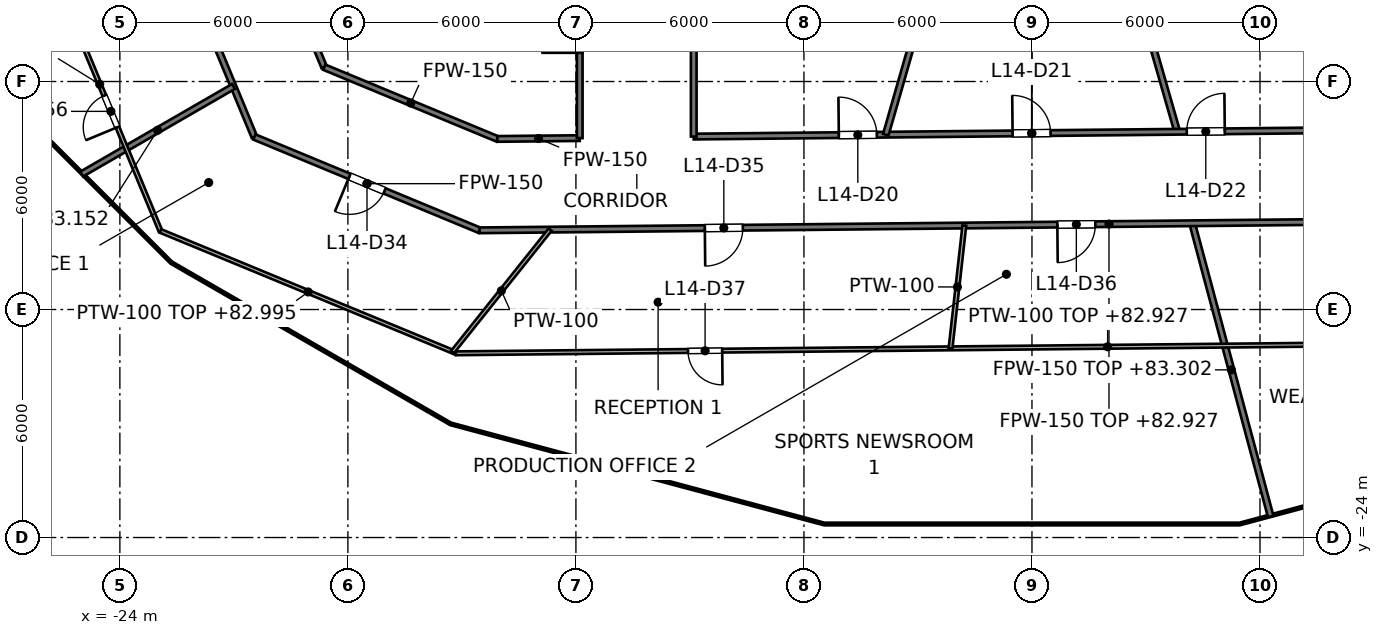
"""IFC4 building model, lengths in metres.
Left out: names, types, materials, properties, quantities, classifications, styles, units other than length and angle.
Written with IfcOpenShell. Run it as: python <this file> out.ifc"""

import sys

from ifc_helpers import new_model, si_unit, direction, frame, frame_2d, origin, place, context, subcontext, project, spatial, rectangle, extrude, element, fill, save


model = new_model("IFC4")
c1 = context("Model", 3, precision=1e-05, world=origin(), true_north=direction((0.0, 1.0)))
c2 = subcontext(c1, "Body", "Model", "MODEL_VIEW")
j1 = project(units=[si_unit("LENGTHUNIT", "METRE"), si_unit("PLANEANGLEUNIT", "RADIAN")], contexts=[c1])
p1 = place(None, origin())
s1 = spatial("IfcSite", under=j1, at=p1, CompositionType="ELEMENT")
p2 = place(p1, origin())
s2 = spatial("IfcBuilding", under=s1, at=p2, CompositionType="ELEMENT")
p3 = place(p2, frame((0.0, 0.0, 79.8)))
s3 = spatial("IfcBuildingStorey", under=s2, at=p3, CompositionType="ELEMENT", Elevation=79.8)
p4 = place(p3, frame((4.215, -15.73, 0.0), z_axis=(0.0, 0.0, 1.0), x_axis=(0.258746779093, -0.965945187011, 0.0)))
e1 = element("IfcWall", 1, at=p4, inside=s3, PredefinedType="PARTITIONING", context=c2, shape_type="SweptSolid", body=[
    extrude(rectangle(XDim=7.988, YDim=0.15, at=frame_2d((3.994, 0.0))), origin(), (0.0, 0.0, 1.0), 3.502),
])
p5 = place(p3, frame((2.296, -8.0, 0.0), z_axis=(0.0, 0.0, 1.0), x_axis=(0.275935525478, -0.961176147113, 0.0)))
e2 = element("IfcWall", 2, at=p5, inside=s3, PredefinedType="PARTITIONING", context=c2, shape_type="SweptSolid", body=[
    extrude(rectangle(XDim=5.548, YDim=0.15, at=frame_2d((2.774, 0.0))), origin(), (0.0, 0.0, 1.0), 4.05),
])
p6 = place(p3, frame((-22.9, -7.572, 0.0), z_axis=(0.0, 0.0, 1.0), x_axis=(0.382860357704, -0.923806227788, 0.0)))
e3 = element("IfcWall", 3, at=p6, inside=s3, PredefinedType="PARTITIONING", context=c2, shape_type="SweptSolid", body=[
    extrude(rectangle(XDim=6.374, YDim=0.15, at=frame_2d((3.187, 0.0))), origin(), (0.0, 0.0, 1.0), 3.195),
])
p7 = place(p6, frame((1.916, 0.0, 0.0)))
e4 = element("IfcOpeningElement", 4, at=p7, cuts=e3, PredefinedType="OPENING", context=c2, shape_type="SweptSolid", body=[
    extrude(rectangle(XDim=1.0, YDim=2.1, at=frame_2d((0.5, 1.05))), frame((0.0, 0.075, 0.0), z_axis=(0.0, -1.0, 0.0), x_axis=(1.0, 0.0, 0.0)), (0.0, 0.0, 1.0), 0.15),
])
p8 = place(p3, frame((-20.5, -7.095, 0.0), z_axis=(0.0, 0.0, 1.0), x_axis=(0.382860567438, -0.923806140866, 0.0)))
e5 = element("IfcWall", 5, at=p8, inside=s3, PredefinedType="PARTITIONING", context=c2, shape_type="SweptSolid", body=[
    extrude(rectangle(XDim=4.902, YDim=0.15, at=frame_2d((2.451, 0.0))), origin(), (0.0, 0.0, 1.0), 3.195),
])
p9 = place(p3, frame((-20.46, -13.46, 0.0), z_axis=(0.0, 0.0, 1.0), x_axis=(0.923801547606, -0.382871650349, 0.0)))
e6 = element("IfcWall", 6, at=p9, inside=s3, PredefinedType="PARTITIONING", context=c2, shape_type="SweptSolid", body=[
    extrude(rectangle(XDim=6.415, YDim=0.15, at=frame_2d((3.208, 0.0))), origin(), (0.0, 0.0, 1.0), 3.195),
])
p10 = place(p9, frame((2.707, 0.0, 0.0)))
e7 = element("IfcOpeningElement", 7, at=p10, cuts=e6, PredefinedType="OPENING", context=c2, shape_type="SweptSolid", body=[
    extrude(rectangle(XDim=1.0, YDim=2.1, at=frame_2d((0.5, 1.05))), frame((0.0, 0.075, 0.0), z_axis=(0.0, -1.0, 0.0), x_axis=(1.0, 0.0, 0.0)), (0.0, 0.0, 1.0), 0.15),
])
p11 = place(p3, frame((-18.623, -11.623, 0.0), z_axis=(0.0, 0.0, 1.0), x_axis=(0.923791670587, -0.38289548098, 0.0)))
e8 = element("IfcWall", 8, at=p11, inside=s3, PredefinedType="PARTITIONING", context=c2, shape_type="SweptSolid", body=[
    extrude(rectangle(XDim=4.931, YDim=0.15, at=frame_2d((2.465, 0.0))), origin(), (0.0, 0.0, 1.0), 3.195),
])
p12 = place(p3, frame((-14.534, -15.916, 0.0), z_axis=(0.0, 0.0, 1.0), x_axis=(0.99995100325, 0.009899045409, 0.0)))
e9 = element("IfcWall", 9, at=p12, inside=s3, PredefinedType="PARTITIONING", context=c2, shape_type="SweptSolid", body=[
    extrude(rectangle(XDim=33.123, YDim=0.15, at=frame_2d((16.561, 0.0))), origin(), (0.0, 0.0, 1.0), 3.127),
])
p13 = place(p12, frame((5.927, 0.0, 0.0)))
e10 = element("IfcOpeningElement", 10, at=p13, cuts=e9, PredefinedType="OPENING", context=c2, shape_type="SweptSolid", body=[
    extrude(rectangle(XDim=1.0, YDim=2.1, at=frame_2d((0.5, 1.05))), frame((0.0, 0.075, 0.0), z_axis=(0.0, -1.0, 0.0), x_axis=(1.0, 0.0, 0.0)), (0.0, 0.0, 1.0), 0.15),
])
p14 = place(p12, frame((15.202, 0.0, 0.0)))
e11 = element("IfcOpeningElement", 11, at=p14, cuts=e9, PredefinedType="OPENING", context=c2, shape_type="SweptSolid", body=[
    extrude(rectangle(XDim=1.0, YDim=2.1, at=frame_2d((0.5, 1.05))), frame((0.0, 0.075, 0.0), z_axis=(0.0, -1.0, 0.0), x_axis=(1.0, 0.0, 0.0)), (0.0, 0.0, 1.0), 0.15),
])
p15 = place(p12, frame((24.01, 0.0, 0.0)))
e12 = element("IfcOpeningElement", 12, at=p15, cuts=e9, PredefinedType="OPENING", context=c2, shape_type="SweptSolid", body=[
    extrude(rectangle(XDim=1.2, YDim=2.1, at=frame_2d((0.6, 1.05))), frame((0.0, 0.075, 0.0), z_axis=(0.0, -1.0, 0.0), x_axis=(1.0, 0.0, 0.0)), (0.0, 0.0, 1.0), 0.15),
])
p16 = place(p3, frame((-14.068, -13.511, 0.0), z_axis=(0.0, 0.0, 1.0), x_axis=(0.999950911515, 0.009908307647, 0.0)))
e13 = element("IfcWall", 13, at=p16, inside=s3, PredefinedType="PARTITIONING", context=c2, shape_type="SweptSolid", body=[
    extrude(rectangle(XDim=2.168, YDim=0.15, at=frame_2d((1.084, 0.0))), origin(), (0.0, 0.0, 1.0), 3.195),
])
p17 = place(p3, frame((-8.9, -13.449, 0.0), z_axis=(0.0, 0.0, 1.0), x_axis=(0.999950969978, 0.009902405776, 0.0)))
e14 = element("IfcWall", 14, at=p17, inside=s3, PredefinedType="PARTITIONING", context=c2, shape_type="SweptSolid", body=[
    extrude(rectangle(XDim=17.801, YDim=0.15, at=frame_2d((8.9, 0.0))), origin(), (0.0, 0.0, 1.0), 3.127),
])
p18 = place(p17, frame((3.818, 0.0, 0.0)))
e15 = element("IfcOpeningElement", 15, at=p18, cuts=e14, PredefinedType="OPENING", context=c2, shape_type="SweptSolid", body=[
    extrude(rectangle(XDim=1.0, YDim=2.1, at=frame_2d((0.5, 1.05))), frame((0.0, 0.075, 0.0), z_axis=(0.0, -1.0, 0.0), x_axis=(1.0, 0.0, 0.0)), (0.0, 0.0, 1.0), 0.15),
])
p19 = place(p17, frame((8.391, 0.0, 0.0)))
e16 = element("IfcOpeningElement", 16, at=p19, cuts=e14, PredefinedType="OPENING", context=c2, shape_type="SweptSolid", body=[
    extrude(rectangle(XDim=1.0, YDim=2.1, at=frame_2d((0.5, 1.05))), frame((0.0, 0.075, 0.0), z_axis=(0.0, -1.0, 0.0), x_axis=(1.0, 0.0, 0.0)), (0.0, 0.0, 1.0), 0.15),
])
p20 = place(p17, frame((12.974, 0.0, 0.0)))
e17 = element("IfcOpeningElement", 17, at=p20, cuts=e14, PredefinedType="OPENING", context=c2, shape_type="SweptSolid", body=[
    extrude(rectangle(XDim=1.0, YDim=2.1, at=frame_2d((0.5, 1.05))), frame((0.0, 0.075, 0.0), z_axis=(0.0, -1.0, 0.0), x_axis=(1.0, 0.0, 0.0)), (0.0, 0.0, 1.0), 0.15),
])
p21 = place(p3, frame((-25.005, -14.436, 0.0), z_axis=(0.0, 0.0, 1.0), x_axis=(0.866022493768, 0.500005040262, 0.0)))
e18 = element("IfcWall", 18, at=p21, inside=s3, PredefinedType="PARTITIONING", context=c2, shape_type="SweptSolid", body=[
    extrude(rectangle(XDim=4.612, YDim=0.15, at=frame_2d((2.306, 0.0))), origin(), (0.0, 0.0, 1.0), 3.352),
])
p22 = place(p3, frame((-3.846, -13.399, 0.0), z_axis=(0.0, 0.0, 1.0), x_axis=(0.275914969745, 0.961182048038, 0.0)))
e19 = element("IfcWall", 19, at=p22, inside=s3, PredefinedType="PARTITIONING", context=c2, shape_type="SweptSolid", body=[
    extrude(rectangle(XDim=5.617, YDim=0.15, at=frame_2d((2.809, 0.0))), origin(), (0.0, 0.0, 1.0), 4.05),
])
p23 = place(p3, frame((-8.9, -13.449, 0.0), z_axis=(0.0, 0.0, 1.0), x_axis=(0.0, 1.0, 0.0)))
e20 = element("IfcWall", 20, at=p23, inside=s3, PredefinedType="PARTITIONING", context=c2, shape_type="SweptSolid", body=[
    extrude(rectangle(XDim=5.449, YDim=0.15, at=frame_2d((2.725, 0.0))), origin(), (0.0, 0.0, 1.0), 3.127),
])
p24 = place(p3, frame((-11.9, -13.49, 0.0), z_axis=(0.0, 0.0, 1.0), x_axis=(0.0, 1.0, 0.0)))
e21 = element("IfcWall", 21, at=p24, inside=s3, PredefinedType="PARTITIONING", context=c2, shape_type="SweptSolid", body=[
    extrude(rectangle(XDim=5.49, YDim=0.15, at=frame_2d((2.745, 0.0))), origin(), (0.0, 0.0, 1.0), 3.195),
])
p25 = place(p24, frame((2.245, 0.0, 0.0)))
e22 = element("IfcOpeningElement", 22, at=p25, cuts=e21, PredefinedType="OPENING", context=c2, shape_type="SweptSolid", body=[
    extrude(rectangle(XDim=1.0, YDim=2.1, at=frame_2d((0.5, 1.05))), frame((0.0, 0.075, 0.0), z_axis=(0.0, -1.0, 0.0), x_axis=(1.0, 0.0, 0.0)), (0.0, 0.0, 1.0), 0.15),
])
p26 = place(p3, frame((-26.13, -8.215, 0.0), z_axis=(0.0, 0.0, 1.0), x_axis=(0.382761353451, -0.923847252691, 0.0)))
e23 = element("IfcWall", 23, at=p26, inside=s3, PredefinedType="PARTITIONING", context=c2, shape_type="SweptSolid", body=[
    extrude(rectangle(XDim=8.353, YDim=0.1, at=frame_2d((4.177, 0.0))), origin(), (0.0, 0.0, 1.0), 3.195),
])
p27 = place(p26, frame((4.498, 0.0, 0.0)))
e24 = element("IfcOpeningElement", 24, at=p27, cuts=e23, PredefinedType="OPENING", context=c2, shape_type="SweptSolid", body=[
    extrude(rectangle(XDim=0.9, YDim=2.1, at=frame_2d((0.45, 1.05))), frame((0.0, 0.05, 0.0), z_axis=(0.0, -1.0, 0.0), x_axis=(1.0, 0.0, 0.0)), (0.0, 0.0, 1.0), 0.1),
])
p28 = place(p3, frame((-22.932, -15.932, 0.0), z_axis=(0.0, 0.0, 1.0), x_axis=(0.924240497819, -0.381810819897, 0.0)))
e25 = element("IfcWall", 25, at=p28, inside=s3, PredefinedType="PARTITIONING", context=c2, shape_type="SweptSolid", body=[
    extrude(rectangle(XDim=8.412, YDim=0.1, at=frame_2d((4.206, 0.0))), origin(), (0.0, 0.0, 1.0), 3.195),
])
p29 = place(p3, frame((-15.161, -19.152, 0.0), z_axis=(0.0, 0.0, 1.0), x_axis=(0.999950294367, 0.009970395935, 0.0)))
e26 = element("IfcWall", 26, at=p29, inside=s3, PredefinedType="PARTITIONING", context=c2, shape_type="SweptSolid", body=[
    extrude(rectangle(XDim=34.306, YDim=0.1, at=frame_2d((17.153, 0.0))), origin(), (0.0, 0.0, 1.0), 3.127),
])
p30 = place(p29, frame((6.111, 0.0, 0.0)))
e27 = element("IfcOpeningElement", 27, at=p30, cuts=e26, PredefinedType="OPENING", context=c2, shape_type="SweptSolid", body=[
    extrude(rectangle(XDim=0.9, YDim=2.1, at=frame_2d((0.45, 1.05))), frame((0.0, 0.05, 0.0), z_axis=(0.0, -1.0, 0.0), x_axis=(1.0, 0.0, 0.0)), (0.0, 0.0, 1.0), 0.1),
])
p31 = place(p29, frame((26.573, 0.0, 0.0)))
e28 = element("IfcOpeningElement", 28, at=p31, cuts=e26, PredefinedType="OPENING", context=c2, shape_type="SweptSolid", body=[
    extrude(rectangle(XDim=0.9, YDim=2.1, at=frame_2d((0.45, 1.05))), frame((0.0, 0.05, 0.0), z_axis=(0.0, -1.0, 0.0), x_axis=(1.0, 0.0, 0.0)), (0.0, 0.0, 1.0), 0.1),
])
p32 = place(p3, frame((-15.246, -19.117, 0.0), z_axis=(0.0, 0.0, 1.0), x_axis=(0.623646106515, 0.781706808099, 0.0)))
e29 = element("IfcWall", 29, at=p32, inside=s3, PredefinedType="PARTITIONING", context=c2, shape_type="SweptSolid", body=[
    extrude(rectangle(XDim=4.118, YDim=0.1, at=frame_2d((2.059, 0.0))), origin(), (0.0, 0.0, 1.0), 4.05),
])
p33 = place(p3, frame((-2.143, -19.023, 0.0), z_axis=(0.0, 0.0, 1.0), x_axis=(0.111855891417, 0.993724438441, 0.0)))
e30 = element("IfcWall", 30, at=p33, inside=s3, PredefinedType="PARTITIONING", context=c2, shape_type="SweptSolid", body=[
    extrude(rectangle(XDim=3.254, YDim=0.1, at=frame_2d((1.627, 0.0))), origin(), (0.0, 0.0, 1.0), 4.05),
])
p34 = place(p18, origin())
e31 = element("IfcDoor", 31, at=p34, inside=s3, OperationType="SINGLE_SWING_LEFT", PredefinedType="DOOR", context=c2, shape_type="SweptSolid", body=[
    extrude(rectangle(XDim=1.0, YDim=2.1, at=frame_2d((0.5, 1.05))), frame((0.0, 0.025, 0.0), z_axis=(0.0, -1.0, 0.0), x_axis=(1.0, 0.0, 0.0)), (0.0, 0.0, 1.0), 0.05),
])
fill(e15, e31)
p35 = place(p19, origin())
e32 = element("IfcDoor", 32, at=p35, inside=s3, OperationType="SINGLE_SWING_LEFT", PredefinedType="DOOR", context=c2, shape_type="SweptSolid", body=[
    extrude(rectangle(XDim=1.0, YDim=2.1, at=frame_2d((0.5, 1.05))), frame((0.0, 0.025, 0.0), z_axis=(0.0, -1.0, 0.0), x_axis=(1.0, 0.0, 0.0)), (0.0, 0.0, 1.0), 0.05),
])
fill(e16, e32)
p36 = place(p20, origin())
e33 = element("IfcDoor", 33, at=p36, inside=s3, OperationType="SINGLE_SWING_RIGHT", PredefinedType="DOOR", context=c2, shape_type="SweptSolid", body=[
    extrude(rectangle(XDim=1.0, YDim=2.1, at=frame_2d((0.5, 1.05))), frame((0.0, 0.025, 0.0), z_axis=(0.0, -1.0, 0.0), x_axis=(1.0, 0.0, 0.0)), (0.0, 0.0, 1.0), 0.05),
])
fill(e17, e33)
p37 = place(p25, origin())
e34 = element("IfcDoor", 34, at=p37, inside=s3, OperationType="SINGLE_SWING_LEFT", PredefinedType="DOOR", context=c2, shape_type="SweptSolid", body=[
    extrude(rectangle(XDim=1.0, YDim=2.1, at=frame_2d((0.5, 1.05))), frame((0.0, 0.025, 0.0), z_axis=(0.0, -1.0, 0.0), x_axis=(1.0, 0.0, 0.0)), (0.0, 0.0, 1.0), 0.05),
])
fill(e22, e34)
p38 = place(p10, origin())
e35 = element("IfcDoor", 35, at=p38, inside=s3, OperationType="SINGLE_SWING_LEFT", PredefinedType="DOOR", context=c2, shape_type="SweptSolid", body=[
    extrude(rectangle(XDim=1.0, YDim=2.1, at=frame_2d((0.5, 1.05))), frame((0.0, 0.025, 0.0), z_axis=(0.0, -1.0, 0.0), x_axis=(1.0, 0.0, 0.0)), (0.0, 0.0, 1.0), 0.05),
])
fill(e7, e35)
p39 = place(p13, origin())
e36 = element("IfcDoor", 36, at=p39, inside=s3, OperationType="SINGLE_SWING_LEFT", PredefinedType="DOOR", context=c2, shape_type="SweptSolid", body=[
    extrude(rectangle(XDim=1.0, YDim=2.1, at=frame_2d((0.5, 1.05))), frame((0.0, 0.025, 0.0), z_axis=(0.0, -1.0, 0.0), x_axis=(1.0, 0.0, 0.0)), (0.0, 0.0, 1.0), 0.05),
])
fill(e10, e36)
p40 = place(p14, origin())
e37 = element("IfcDoor", 37, at=p40, inside=s3, OperationType="SINGLE_SWING_LEFT", PredefinedType="DOOR", context=c2, shape_type="SweptSolid", body=[
    extrude(rectangle(XDim=1.0, YDim=2.1, at=frame_2d((0.5, 1.05))), frame((0.0, 0.025, 0.0), z_axis=(0.0, -1.0, 0.0), x_axis=(1.0, 0.0, 0.0)), (0.0, 0.0, 1.0), 0.05),
])
fill(e11, e37)
p41 = place(p30, origin())
e38 = element("IfcDoor", 38, at=p41, inside=s3, OperationType="SINGLE_SWING_RIGHT", PredefinedType="DOOR", context=c2, shape_type="SweptSolid", body=[
    extrude(rectangle(XDim=0.9, YDim=2.1, at=frame_2d((0.45, 1.05))), frame((0.0, 0.025, 0.0), z_axis=(0.0, -1.0, 0.0), x_axis=(1.0, 0.0, 0.0)), (0.0, 0.0, 1.0), 0.05),
])
fill(e27, e38)
p42 = place(p27, origin())
e39 = element("IfcDoor", 39, at=p42, inside=s3, OperationType="SINGLE_SWING_RIGHT", PredefinedType="DOOR", context=c2, shape_type="SweptSolid", body=[
    extrude(rectangle(XDim=0.9, YDim=2.1, at=frame_2d((0.45, 1.05))), frame((0.0, 0.025, 0.0), z_axis=(0.0, -1.0, 0.0), x_axis=(1.0, 0.0, 0.0)), (0.0, 0.0, 1.0), 0.05),
])
fill(e24, e39)
save(model, sys.argv[1])
